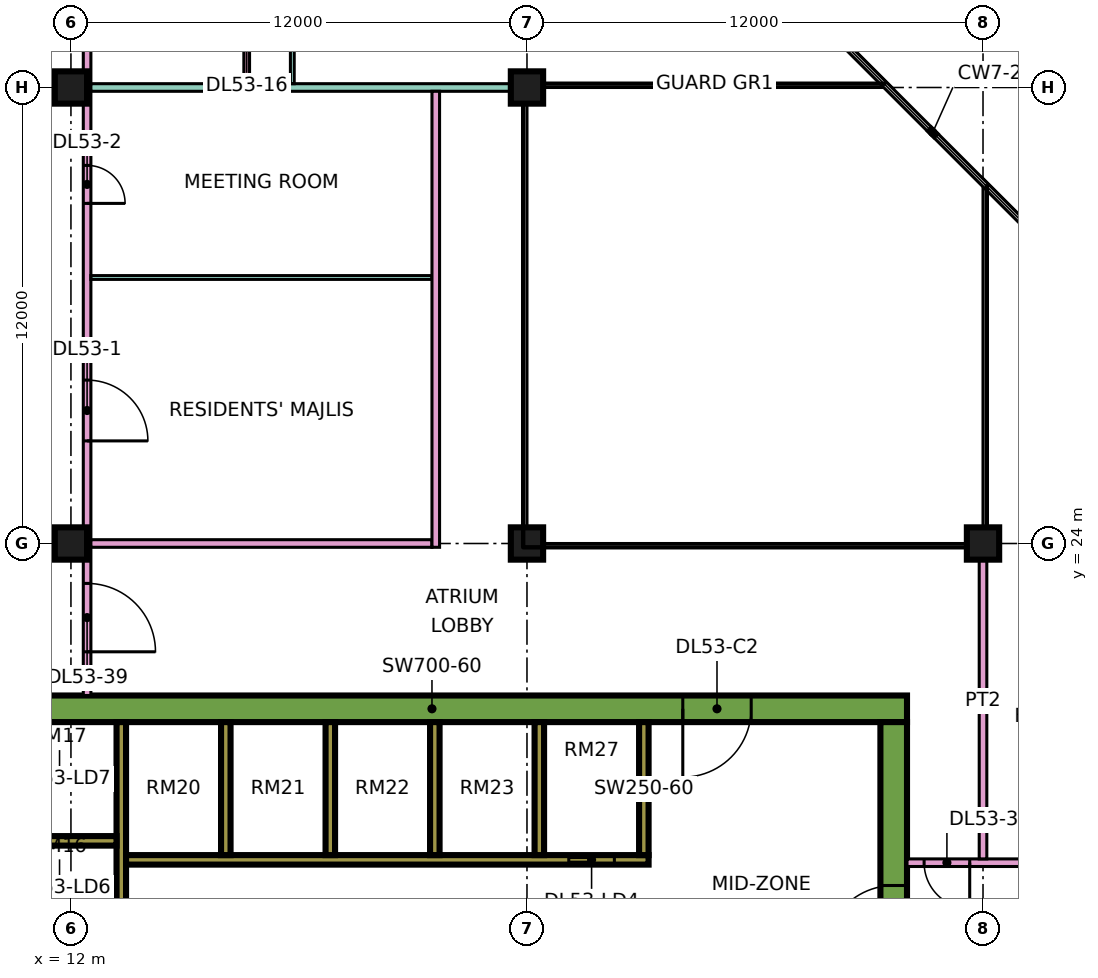
"""IFC4 building model, lengths in metres.
Left out: names, types, materials, properties, quantities, classifications, styles, units other than length and angle.
Written with IfcOpenShell. Run it as: python <this file> out.ifc"""

import sys

from ifc_helpers import new_model, si_unit, direction, frame, frame_2d, origin, origin_2d, place, context, subcontext, project, spatial, rectangle, extrude, element, fill, save


model = new_model("IFC4")
c1 = context("Model", 3, precision=1e-05, world=origin(), true_north=direction((0.0, 1.0)))
c2 = subcontext(c1, "Body", "Model", "MODEL_VIEW")
j1 = project(units=[si_unit("LENGTHUNIT", "METRE"), si_unit("PLANEANGLEUNIT", "RADIAN")], contexts=[c1])
p1 = place(None, origin())
s1 = spatial("IfcSite", under=j1, at=p1, CompositionType="ELEMENT")
p2 = place(p1, origin())
s2 = spatial("IfcBuilding", under=s1, at=p2, CompositionType="ELEMENT")
p3 = place(p2, frame((0.0, 0.0, 226.65)))
s3 = spatial("IfcBuildingStorey", under=s2, at=p3, CompositionType="ELEMENT", Elevation=226.65)
for number, where, z_axis, x_axis in (
    (1, (12.0, 24.0, 0.0), (0.0, 0.0, 1.0), (1.0, 0.0, 0.0)),
    (2, (12.0, 36.0, 0.0), (0.0, 0.0, 1.0), (1.0, 0.0, 0.0)),
    (3, (24.0, 24.0, 0.0), (0.0, 0.0, 1.0), (1.0, 0.0, 0.0)),
    (4, (24.0, 36.0, 0.0), (0.0, 0.0, 1.0), (1.0, 0.0, 0.0)),
    (5, (36.0, 24.0, 0.0), (0.0, 0.0, 1.0), (1.0, 0.0, 0.0)),
):
    element("IfcColumn", number, at=place(p3, frame(where, z_axis=z_axis, x_axis=x_axis)), inside=s3, PredefinedType="COLUMN", context=c2, shape_type="SweptSolid", body=[
        extrude(rectangle(XDim=0.85, YDim=0.85, at=origin_2d()), origin(), (0.0, 0.0, 1.0), 3.75),
    ])
p4 = place(p3, frame((9.0, 19.65, 0.0), z_axis=(0.0, 0.0, 1.0), x_axis=(1.0, 0.0, 0.0)))
e6 = element("IfcWall", 6, at=p4, inside=s3, PredefinedType="SHEAR", context=c2, shape_type="SweptSolid", body=[
    extrude(rectangle(XDim=25.0, YDim=0.7, at=frame_2d((12.5, 0.0))), origin(), (0.0, 0.0, 1.0), 3.75),
])
p5 = place(p4, frame((19.1, 0.0, 0.0)))
e7 = element("IfcOpeningElement", 7, at=p5, cuts=e6, PredefinedType="OPENING", context=c2, shape_type="SweptSolid", body=[
    extrude(rectangle(XDim=1.8, YDim=2.4, at=frame_2d((0.9, 1.2))), frame((0.0, 0.36, 0.0), z_axis=(0.0, -1.0, 0.0), x_axis=(1.0, 0.0, 0.0)), (0.0, 0.0, 1.0), 0.72),
])
p6 = place(p3, frame((33.65, 7.7, 0.0), z_axis=(0.0, 0.0, 1.0), x_axis=(0.0, 1.0, 0.0)))
e8 = element("IfcWall", 8, at=p6, inside=s3, PredefinedType="SHEAR", context=c2, shape_type="SweptSolid", body=[
    extrude(rectangle(XDim=11.6, YDim=0.7, at=frame_2d((5.8, 0.0))), origin(), (0.0, 0.0, 1.0), 3.75),
])
p7 = place(p6, frame((5.5, 0.0, 0.0)))
e9 = element("IfcOpeningElement", 9, at=p7, cuts=e8, PredefinedType="OPENING", context=c2, shape_type="SweptSolid", body=[
    extrude(rectangle(XDim=1.8, YDim=2.4, at=frame_2d((0.9, 1.2))), frame((0.0, 0.36, 0.0), z_axis=(0.0, -1.0, 0.0), x_axis=(1.0, 0.0, 0.0)), (0.0, 0.0, 1.0), 0.72),
])
p8 = place(p3, frame((13.325, 7.7, 0.0), z_axis=(0.0, 0.0, 1.0), x_axis=(0.0, 1.0, 0.0)))
e10 = element("IfcWall", 10, at=p8, inside=s3, PredefinedType="SHEAR", context=c2, shape_type="SweptSolid", body=[
    extrude(rectangle(XDim=11.6, YDim=0.25, at=frame_2d((5.8, 0.0))), origin(), (0.0, 0.0, 1.0), 3.75),
])
p9 = place(p3, frame((13.45, 15.675, 0.0), z_axis=(0.0, 0.0, 1.0), x_axis=(1.0, 0.0, 0.0)))
e11 = element("IfcWall", 11, at=p9, inside=s3, PredefinedType="SHEAR", context=c2, shape_type="SweptSolid", body=[
    extrude(rectangle(XDim=13.75, YDim=0.25, at=frame_2d((6.875, 0.0))), origin(), (0.0, 0.0, 1.0), 3.75),
])
p10 = place(p9, frame((11.65, 0.0, 0.0)))
e12 = element("IfcOpeningElement", 12, at=p10, cuts=e11, PredefinedType="OPENING", context=c2, shape_type="SweptSolid", body=[
    extrude(rectangle(XDim=1.2, YDim=2.2, at=frame_2d((0.6, 1.1))), frame((0.0, 0.135, 0.0), z_axis=(0.0, -1.0, 0.0), x_axis=(1.0, 0.0, 0.0)), (0.0, 0.0, 1.0), 0.27),
])
p11 = place(p3, frame((10.2, 16.175, 0.0), z_axis=(0.0, 0.0, 1.0), x_axis=(1.0, 0.0, 0.0)))
e13 = element("IfcWall", 13, at=p11, inside=s3, PredefinedType="SHEAR", context=c2, shape_type="SweptSolid", body=[
    extrude(rectangle(XDim=3.0, YDim=0.25, at=frame_2d((1.5, 0.0))), origin(), (0.0, 0.0, 1.0), 3.75),
])
for number, where, z_axis, x_axis in (
    (14, (16.075, 15.8, 0.0), (0.0, 0.0, 1.0), (0.0, 1.0, 0.0)),
    (15, (18.825, 15.8, 0.0), (0.0, 0.0, 1.0), (0.0, 1.0, 0.0)),
    (16, (21.575, 15.8, 0.0), (0.0, 0.0, 1.0), (0.0, 1.0, 0.0)),
    (17, (24.325, 15.8, 0.0), (0.0, 0.0, 1.0), (0.0, 1.0, 0.0)),
    (18, (27.075, 15.8, 0.0), (0.0, 0.0, 1.0), (0.0, 1.0, 0.0)),
):
    element("IfcWall", number, at=place(p3, frame(where, z_axis=z_axis, x_axis=x_axis)), inside=s3, PredefinedType="SHEAR", context=c2, shape_type="SweptSolid", body=[
        extrude(rectangle(XDim=3.5, YDim=0.25, at=frame_2d((1.75, 0.0))), origin(), (0.0, 0.0, 1.0), 3.75),
    ])
p12 = place(p3, frame((12.425, 20.0, 0.0), z_axis=(0.0, 0.0, 1.0), x_axis=(0.0, 1.0, 0.0)))
e19 = element("IfcWall", 19, at=p12, inside=s3, PredefinedType="PARTITIONING", context=c2, shape_type="SweptSolid", body=[
    extrude(rectangle(XDim=42.926, YDim=0.2, at=frame_2d((21.463, 0.0))), origin(), (0.0, 0.0, 1.0), 3.35),
])
p13 = place(p12, frame((6.7, 0.0, 0.0)))
e20 = element("IfcOpeningElement", 20, at=p13, cuts=e19, PredefinedType="OPENING", context=c2, shape_type="SweptSolid", body=[
    extrude(rectangle(XDim=1.6, YDim=2.1, at=frame_2d((0.8, 1.05))), frame((0.0, 0.11, 0.0), z_axis=(0.0, -1.0, 0.0), x_axis=(1.0, 0.0, 0.0)), (0.0, 0.0, 1.0), 0.22),
])
p14 = place(p12, frame((12.95, 0.0, 0.0)))
e21 = element("IfcOpeningElement", 21, at=p14, cuts=e19, PredefinedType="OPENING", context=c2, shape_type="SweptSolid", body=[
    extrude(rectangle(XDim=1.0, YDim=2.1, at=frame_2d((0.5, 1.05))), frame((0.0, 0.11, 0.0), z_axis=(0.0, -1.0, 0.0), x_axis=(1.0, 0.0, 0.0)), (0.0, 0.0, 1.0), 0.22),
])
p15 = place(p12, frame((23.2, 0.0, 0.0)))
e22 = element("IfcOpeningElement", 22, at=p15, cuts=e19, PredefinedType="OPENING", context=c2, shape_type="SweptSolid", body=[
    extrude(rectangle(XDim=1.0, YDim=2.1, at=frame_2d((0.5, 1.05))), frame((0.0, 0.11, 0.0), z_axis=(0.0, -1.0, 0.0), x_axis=(1.0, 0.0, 0.0)), (0.0, 0.0, 1.0), 0.22),
])
p16 = place(p12, frame((35.35, 0.0, 0.0)))
e23 = element("IfcOpeningElement", 23, at=p16, cuts=e19, PredefinedType="OPENING", context=c2, shape_type="SweptSolid", body=[
    extrude(rectangle(XDim=1.0, YDim=2.1, at=frame_2d((0.5, 1.05))), frame((0.0, 0.11, 0.0), z_axis=(0.0, -1.0, 0.0), x_axis=(1.0, 0.0, 0.0)), (0.0, 0.0, 1.0), 0.22),
])
p17 = place(p12, frame((1.15, 0.0, 0.0)))
e24 = element("IfcOpeningElement", 24, at=p17, cuts=e19, PredefinedType="OPENING", context=c2, shape_type="SweptSolid", body=[
    extrude(rectangle(XDim=1.8, YDim=2.1, at=frame_2d((0.9, 1.05))), frame((0.0, 0.11, 0.0), z_axis=(0.0, -1.0, 0.0), x_axis=(1.0, 0.0, 0.0)), (0.0, 0.0, 1.0), 0.22),
])
p18 = place(p12, frame((28.6, 0.0, 0.0)))
e25 = element("IfcOpeningElement", 25, at=p18, cuts=e19, PredefinedType="OPENING", context=c2, shape_type="SweptSolid", body=[
    extrude(rectangle(XDim=1.8, YDim=2.1, at=frame_2d((0.9, 1.05))), frame((0.0, 0.11, 0.0), z_axis=(0.0, -1.0, 0.0), x_axis=(1.0, 0.0, 0.0)), (0.0, 0.0, 1.0), 0.22),
])
p19 = place(p3, frame((12.525, 24.0, 0.0), z_axis=(0.0, 0.0, 1.0), x_axis=(1.0, 0.0, 0.0)))
e26 = element("IfcWall", 26, at=p19, inside=s3, PredefinedType="PARTITIONING", context=c2, shape_type="SweptSolid", body=[
    extrude(rectangle(XDim=8.975, YDim=0.2, at=frame_2d((4.488, 0.0))), origin(), (0.0, 0.0, 1.0), 3.35),
])
p20 = place(p3, frame((12.525, 31.0, 0.0), z_axis=(0.0, 0.0, 1.0), x_axis=(1.0, 0.0, 0.0)))
e27 = element("IfcWall", 27, at=p20, inside=s3, PredefinedType="PARTITIONING", context=c2, shape_type="SweptSolid", body=[
    extrude(rectangle(XDim=8.975, YDim=0.1, at=frame_2d((4.488, 0.0))), origin(), (0.0, 0.0, 1.0), 3.35),
])
p21 = place(p3, frame((12.525, 36.0, 0.0), z_axis=(0.0, 0.0, 1.0), x_axis=(1.0, 0.0, 0.0)))
e28 = element("IfcWall", 28, at=p21, inside=s3, PredefinedType="PARTITIONING", context=c2, shape_type="SweptSolid", body=[
    extrude(rectangle(XDim=11.475, YDim=0.2, at=frame_2d((5.738, 0.0))), origin(), (0.0, 0.0, 1.0), 3.35),
])
p22 = place(p3, frame((16.625, 36.1, 0.0), z_axis=(0.0, 0.0, 1.0), x_axis=(0.0, 1.0, 0.0)))
e29 = element("IfcWall", 29, at=p22, inside=s3, PredefinedType="PARTITIONING", context=c2, shape_type="SweptSolid", body=[
    extrude(rectangle(XDim=6.275, YDim=0.15, at=frame_2d((3.137, 0.0))), origin(), (0.0, 0.0, 1.0), 3.35),
])
p23 = place(p22, frame((1.1, 0.0, 0.0)))
e30 = element("IfcOpeningElement", 30, at=p23, cuts=e29, PredefinedType="OPENING", context=c2, shape_type="SweptSolid", body=[
    extrude(rectangle(XDim=0.9, YDim=2.1, at=frame_2d((0.45, 1.05))), frame((0.0, 0.085, 0.0), z_axis=(0.0, -1.0, 0.0), x_axis=(1.0, 0.0, 0.0)), (0.0, 0.0, 1.0), 0.17),
])
p24 = place(p3, frame((17.825, 36.1, 0.0), z_axis=(0.0, 0.0, 1.0), x_axis=(0.0, 1.0, 0.0)))
e31 = element("IfcWall", 31, at=p24, inside=s3, PredefinedType="PARTITIONING", context=c2, shape_type="SweptSolid", body=[
    extrude(rectangle(XDim=2.85, YDim=0.1, at=frame_2d((1.425, 0.0))), origin(), (0.0, 0.0, 1.0), 3.35),
])
p25 = place(p24, frame((0.95, 0.0, 0.0)))
e32 = element("IfcOpeningElement", 32, at=p25, cuts=e31, PredefinedType="OPENING", context=c2, shape_type="SweptSolid", body=[
    extrude(rectangle(XDim=0.9, YDim=2.1, at=frame_2d((0.45, 1.05))), frame((0.0, 0.06, 0.0), z_axis=(0.0, -1.0, 0.0), x_axis=(1.0, 0.0, 0.0)), (0.0, 0.0, 1.0), 0.12),
])
p26 = place(p3, frame((21.6, 23.9, 0.0), z_axis=(0.0, 0.0, 1.0), x_axis=(0.0, 1.0, 0.0)))
e33 = element("IfcWall", 33, at=p26, inside=s3, PredefinedType="PARTITIONING", context=c2, shape_type="SweptSolid", body=[
    extrude(rectangle(XDim=12.0, YDim=0.2, at=frame_2d((6.0, 0.0))), origin(), (0.0, 0.0, 1.0), 3.35),
])
p27 = place(p3, frame((34.0, 15.6, 0.0), z_axis=(0.0, 0.0, 1.0), x_axis=(1.0, 0.0, 0.0)))
e34 = element("IfcWall", 34, at=p27, inside=s3, PredefinedType="PARTITIONING", context=c2, shape_type="SweptSolid", body=[
    extrude(rectangle(XDim=10.35, YDim=0.2, at=frame_2d((5.175, 0.0))), origin(), (0.0, 0.0, 1.0), 3.35),
])
p28 = place(p27, frame((5.6, 0.0, 0.0)))
e35 = element("IfcOpeningElement", 35, at=p28, cuts=e34, PredefinedType="OPENING", context=c2, shape_type="SweptSolid", body=[
    extrude(rectangle(XDim=1.0, YDim=2.1, at=frame_2d((0.5, 1.05))), frame((0.0, 0.11, 0.0), z_axis=(0.0, -1.0, 0.0), x_axis=(1.0, 0.0, 0.0)), (0.0, 0.0, 1.0), 0.22),
])
p29 = place(p27, frame((0.45, 0.0, 0.0)))
e36 = element("IfcOpeningElement", 36, at=p29, cuts=e34, PredefinedType="OPENING", context=c2, shape_type="SweptSolid", body=[
    extrude(rectangle(XDim=1.2, YDim=2.1, at=frame_2d((0.6, 1.05))), frame((0.0, 0.11, 0.0), z_axis=(0.0, -1.0, 0.0), x_axis=(1.0, 0.0, 0.0)), (0.0, 0.0, 1.0), 0.22),
])
p30 = place(p3, frame((36.0, 15.7, 0.0), z_axis=(0.0, 0.0, 1.0), x_axis=(0.0, 1.0, 0.0)))
e37 = element("IfcWall", 37, at=p30, inside=s3, PredefinedType="PARTITIONING", context=c2, shape_type="SweptSolid", body=[
    extrude(rectangle(XDim=8.3, YDim=0.2, at=frame_2d((4.15, 0.0))), origin(), (0.0, 0.0, 1.0), 3.35),
])
p31 = place(p10, origin())
e38 = element("IfcDoor", 38, at=p31, inside=s3, OperationType="DOUBLE_DOOR_SLIDING", PredefinedType="DOOR", context=c2, shape_type="SweptSolid", body=[
    extrude(rectangle(XDim=1.2, YDim=2.2, at=frame_2d((0.6, 1.1))), frame((0.0, 0.025, 0.0), z_axis=(0.0, -1.0, 0.0), x_axis=(1.0, 0.0, 0.0)), (0.0, 0.0, 1.0), 0.05),
])
fill(e12, e38)
p32 = place(p7, origin())
e39 = element("IfcDoor", 39, at=p32, inside=s3, OperationType="DOUBLE_DOOR_SINGLE_SWING", PredefinedType="DOOR", context=c2, shape_type="SweptSolid", body=[
    extrude(rectangle(XDim=1.8, YDim=2.4, at=frame_2d((0.9, 1.2))), frame((0.0, 0.025, 0.0), z_axis=(0.0, -1.0, 0.0), x_axis=(1.0, 0.0, 0.0)), (0.0, 0.0, 1.0), 0.05),
])
fill(e9, e39)
p33 = place(p5, frame((1.8, 0.0, 0.0), z_axis=(0.0, 0.0, 1.0), x_axis=(-1.0, 0.0, 0.0)))
e40 = element("IfcDoor", 40, at=p33, inside=s3, OperationType="DOUBLE_DOOR_SINGLE_SWING", PredefinedType="DOOR", context=c2, shape_type="SweptSolid", body=[
    extrude(rectangle(XDim=1.8, YDim=2.4, at=frame_2d((0.9, 1.2))), frame((0.0, 0.025, 0.0), z_axis=(0.0, -1.0, 0.0), x_axis=(1.0, 0.0, 0.0)), (0.0, 0.0, 1.0), 0.05),
])
fill(e7, e40)
p34 = place(p13, frame((1.6, 0.0, 0.0), z_axis=(0.0, 0.0, 1.0), x_axis=(-1.0, 0.0, 0.0)))
e41 = element("IfcDoor", 41, at=p34, inside=s3, OperationType="DOUBLE_DOOR_SINGLE_SWING", PredefinedType="DOOR", context=c2, shape_type="SweptSolid", body=[
    extrude(rectangle(XDim=1.6, YDim=2.1, at=frame_2d((0.8, 1.05))), frame((0.0, 0.025, 0.0), z_axis=(0.0, -1.0, 0.0), x_axis=(1.0, 0.0, 0.0)), (0.0, 0.0, 1.0), 0.05),
])
fill(e20, e41)
p35 = place(p14, frame((1.0, 0.0, 0.0), z_axis=(0.0, 0.0, 1.0), x_axis=(-1.0, 0.0, 0.0)))
e42 = element("IfcDoor", 42, at=p35, inside=s3, OperationType="SINGLE_SWING_LEFT", PredefinedType="DOOR", context=c2, shape_type="SweptSolid", body=[
    extrude(rectangle(XDim=1.0, YDim=2.1, at=frame_2d((0.5, 1.05))), frame((0.0, 0.025, 0.0), z_axis=(0.0, -1.0, 0.0), x_axis=(1.0, 0.0, 0.0)), (0.0, 0.0, 1.0), 0.05),
])
fill(e21, e42)
p36 = place(p29, origin())
e43 = element("IfcDoor", 43, at=p36, inside=s3, OperationType="SINGLE_SWING_RIGHT", PredefinedType="DOOR", context=c2, shape_type="SweptSolid", body=[
    extrude(rectangle(XDim=1.2, YDim=2.1, at=frame_2d((0.6, 1.05))), frame((0.0, 0.025, 0.0), z_axis=(0.0, -1.0, 0.0), x_axis=(1.0, 0.0, 0.0)), (0.0, 0.0, 1.0), 0.05),
])
fill(e36, e43)
p37 = place(p17, frame((1.8, 0.0, 0.0), z_axis=(0.0, 0.0, 1.0), x_axis=(-1.0, 0.0, 0.0)))
e44 = element("IfcDoor", 44, at=p37, inside=s3, OperationType="DOUBLE_DOOR_SINGLE_SWING", PredefinedType="DOOR", context=c2, shape_type="SweptSolid", body=[
    extrude(rectangle(XDim=1.8, YDim=2.1, at=frame_2d((0.9, 1.05))), frame((0.0, 0.025, 0.0), z_axis=(0.0, -1.0, 0.0), x_axis=(1.0, 0.0, 0.0)), (0.0, 0.0, 1.0), 0.05),
])
fill(e24, e44)
save(model, sys.argv[1])
